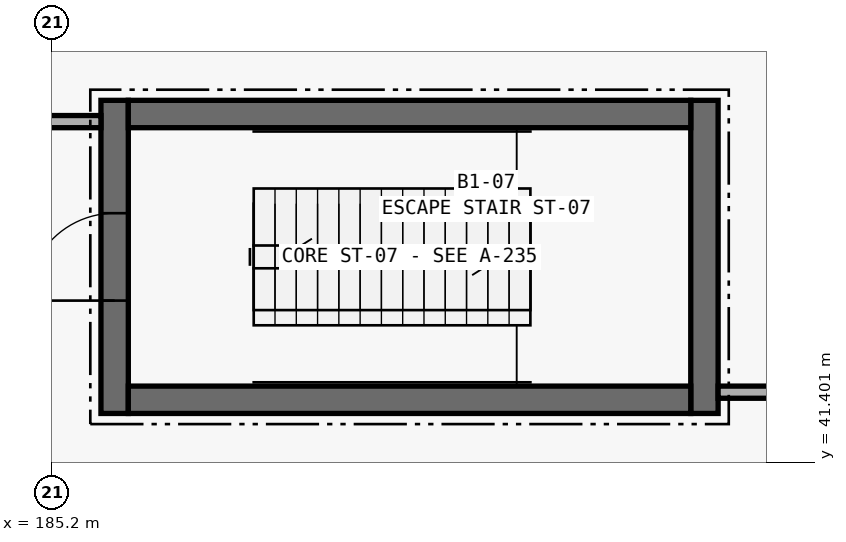
"""IFC4 building model, lengths in metres.
Left out: names, types, materials, properties, quantities, classifications, styles, units other than length and angle.
Written with IfcOpenShell. Run it as: python <this file> out.ifc"""

import sys

from ifc_helpers import new_model, si_unit, direction, frame, frame_2d, origin, place, context, subcontext, project, spatial, rectangle, extrude, element, fill, save


model = new_model("IFC4")
c1 = context("Model", 3, precision=1e-05, world=origin(), true_north=direction((0.0, 1.0)))
c2 = subcontext(c1, "Body", "Model", "MODEL_VIEW")
j1 = project(units=[si_unit("LENGTHUNIT", "METRE"), si_unit("PLANEANGLEUNIT", "RADIAN")], contexts=[c1])
p1 = place(None, origin())
s1 = spatial("IfcSite", under=j1, at=p1, CompositionType="ELEMENT")
p2 = place(p1, origin())
s2 = spatial("IfcBuilding", under=s1, at=p2, CompositionType="ELEMENT")
p3 = place(p2, frame((0.0, 0.0, -4.8)))
s3 = spatial("IfcBuildingStorey", under=s2, at=p3, CompositionType="ELEMENT", Elevation=-4.8)
p4 = place(p3, frame((186.02, 42.04, 0.0), z_axis=(0.0, 0.0, 1.0), x_axis=(0.0, 1.0, 0.0)))
e1 = element("IfcWall", 1, at=p4, inside=s3, PredefinedType="SHEAR", context=c2, shape_type="SweptSolid", body=[
    extrude(rectangle(XDim=4.12, YDim=0.36, at=frame_2d((2.06, 0.0))), origin(), (0.0, 0.0, 1.0), 4.38),
])
p5 = place(p4, frame((1.485, 0.0, 0.0)))
e2 = element("IfcOpeningElement", 2, at=p5, cuts=e1, PredefinedType="OPENING", context=c2, shape_type="SweptSolid", body=[
    extrude(rectangle(XDim=1.15, YDim=2.15, at=frame_2d((0.575, 1.075))), frame((0.0, 0.195, 0.0), z_axis=(0.0, -1.0, 0.0), x_axis=(1.0, 0.0, 0.0)), (0.0, 0.0, 1.0), 0.39),
])
p6 = place(p3, frame((193.78, 42.04, 0.0), z_axis=(0.0, 0.0, 1.0), x_axis=(0.0, 1.0, 0.0)))
e3 = element("IfcWall", 3, at=p6, inside=s3, PredefinedType="SHEAR", context=c2, shape_type="SweptSolid", body=[
    extrude(rectangle(XDim=4.12, YDim=0.36, at=frame_2d((2.06, 0.0))), origin(), (0.0, 0.0, 1.0), 4.38),
])
for number, where, z_axis, x_axis in (
    (4, (186.2, 45.98, 0.0), (0.0, 0.0, 1.0), (1.0, 0.0, 0.0)),
    (5, (186.2, 42.22, 0.0), (0.0, 0.0, 1.0), (1.0, 0.0, 0.0)),
):
    element("IfcWall", number, at=place(p3, frame(where, z_axis=z_axis, x_axis=x_axis)), inside=s3, PredefinedType="SHEAR", context=c2, shape_type="SweptSolid", body=[
        extrude(rectangle(XDim=7.4, YDim=0.36, at=frame_2d((3.7, 0.0))), origin(), (0.0, 0.0, 1.0), 4.38),
    ])
p7 = place(p3, frame((193.96, 42.32, 0.0), z_axis=(0.0, 0.0, 1.0), x_axis=(1.0, 0.0, 0.0)))
e6 = element("IfcWall", 6, at=p7, inside=s3, PredefinedType="PARTITIONING", context=c2, shape_type="SweptSolid", body=[
    extrude(rectangle(XDim=11.015, YDim=0.16, at=frame_2d((5.508, 0.0))), origin(), (0.0, 0.0, 1.0), 3.26),
])
p8 = place(p7, frame((4.758, 0.0, 0.0)))
e7 = element("IfcOpeningElement", 7, at=p8, cuts=e6, PredefinedType="OPENING", context=c2, shape_type="SweptSolid", body=[
    extrude(rectangle(XDim=1.5, YDim=2.2, at=frame_2d((0.75, 1.1))), frame((0.0, 0.095, 0.0), z_axis=(0.0, -1.0, 0.0), x_axis=(1.0, 0.0, 0.0)), (0.0, 0.0, 1.0), 0.19),
])
p9 = place(p3, frame((181.84, 45.88, 0.0), z_axis=(0.0, 0.0, 1.0), x_axis=(1.0, 0.0, 0.0)))
e8 = element("IfcWall", 8, at=p9, inside=s3, PredefinedType="PARTITIONING", context=c2, shape_type="SweptSolid", body=[
    extrude(rectangle(XDim=4.0, YDim=0.16, at=frame_2d((2.0, 0.0))), origin(), (0.0, 0.0, 1.0), 3.26),
])
p10 = place(p5, origin())
e9 = element("IfcDoor", 9, at=p10, inside=s3, OperationType="SINGLE_SWING_LEFT", PredefinedType="DOOR", context=c2, shape_type="SweptSolid", body=[
    extrude(rectangle(XDim=1.15, YDim=2.15, at=frame_2d((0.575, 1.075))), frame((0.0, 0.025, 0.0), z_axis=(0.0, -1.0, 0.0), x_axis=(1.0, 0.0, 0.0)), (0.0, 0.0, 1.0), 0.05),
])
fill(e2, e9)
save(model, sys.argv[1])
